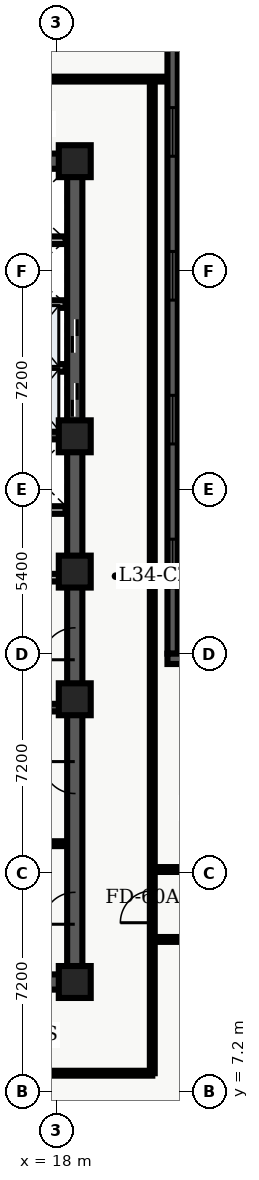
"""IFC4 building model, lengths in metres.
Left out: names, types, materials, properties, quantities, classifications, styles, units other than length and angle.
Written with IfcOpenShell. Run it as: python <this file> out.ifc"""

import sys

from ifc_helpers import new_model, entity, si_unit, converted_unit, direction, frame, origin_with_axes, origin_2d_with_axis, place, context, subcontext, project, spatial, polyline, rectangle, outline, extrude, element, fill, save


model = new_model("IFC4")
c1 = context("Model", 3, precision=1e-05, world=origin_with_axes(), true_north=direction((0.0, 1.0)))
c2 = subcontext(c1, "Body", "Model", "MODEL_VIEW")
j1 = project(units=[si_unit("LENGTHUNIT", "METRE"), converted_unit("PLANEANGLEUNIT", "DEGREE", entity("IfcPlaneAngleMeasure", 0.017), si_unit("PLANEANGLEUNIT", "RADIAN"), dimensions=[0, 0, 0, 0, 0, 0, 0])], contexts=[c1])
p1 = place(None, origin_with_axes())
s1 = spatial("IfcSite", under=j1, at=p1, CompositionType="ELEMENT")
p2 = place(p1, origin_with_axes())
s2 = spatial("IfcBuilding", under=s1, at=p2, CompositionType="ELEMENT")
p3 = place(p2, frame((0.0, 0.0, 140.7), z_axis=(0.0, 0.0, 1.0), x_axis=(1.0, 0.0, 0.0)))
s3 = spatial("IfcBuildingStorey", under=s2, at=p3, CompositionType="ELEMENT", Elevation=140.7)
p4 = place(p3, frame((11.4, 10.8, 0.0), z_axis=(0.0, 0.0, 1.0), x_axis=(1.0, 0.0, 0.0)))
e1 = element("IfcWall", 1, at=p4, inside=s3, PredefinedType="SHEAR", context=c2, shape_type="SweptSolid", body=[
    extrude(outline(polyline([(0.0, -0.25), (7.2, -0.25), (7.2, 0.25), (0.0, 0.25), (0.0, -0.25)])), origin_with_axes(), (0.0, 0.0, 1.0), 3.66),
])
p5 = place(p4, frame((2.625, 0.0, 0.0), z_axis=(0.0, 0.0, 1.0), x_axis=(1.0, 0.0, 0.0)))
e2 = element("IfcOpeningElement", 2, at=p5, cuts=e1, PredefinedType="OPENING", context=c2, shape_type="SweptSolid", body=[
    extrude(rectangle(XDim=1.05, YDim=0.52, at=origin_2d_with_axis()), origin_with_axes(), (0.0, 0.0, 1.0), 2.15),
])
p6 = place(p3, frame((11.4, 37.8, 0.0), z_axis=(0.0, 0.0, 1.0), x_axis=(1.0, 0.0, 0.0)))
e3 = element("IfcWall", 3, at=p6, inside=s3, PredefinedType="SHEAR", context=c2, shape_type="SweptSolid", body=[
    extrude(outline(polyline([(0.0, -0.25), (7.2, -0.25), (7.2, 0.25), (0.0, 0.25), (0.0, -0.25)])), origin_with_axes(), (0.0, 0.0, 1.0), 3.66),
])
p7 = place(p6, frame((2.625, 0.0, 0.0), z_axis=(0.0, 0.0, 1.0), x_axis=(1.0, 0.0, 0.0)))
e4 = element("IfcOpeningElement", 4, at=p7, cuts=e3, PredefinedType="OPENING", context=c2, shape_type="SweptSolid", body=[
    extrude(rectangle(XDim=1.05, YDim=0.52, at=origin_2d_with_axis()), origin_with_axes(), (0.0, 0.0, 1.0), 2.15),
])
p8 = place(p3, frame((18.6, 10.8, 0.0), z_axis=(0.0, 0.0, 1.0), x_axis=(0.0, 1.0, 0.0)))
e5 = element("IfcWall", 5, at=p8, inside=s3, PredefinedType="SHEAR", context=c2, shape_type="SweptSolid", body=[
    extrude(outline(polyline([(0.0, -0.25), (13.5, -0.25), (13.5, 0.25), (0.0, 0.25), (0.0, -0.25)])), origin_with_axes(), (0.0, 0.0, 1.0), 3.66),
])
p9 = place(p8, frame((11.125, 0.0, 0.0), z_axis=(0.0, 0.0, 1.0), x_axis=(1.0, 0.0, 0.0)))
e6 = element("IfcOpeningElement", 6, at=p9, cuts=e5, PredefinedType="OPENING", context=c2, shape_type="SweptSolid", body=[
    extrude(rectangle(XDim=1.05, YDim=0.52, at=origin_2d_with_axis()), origin_with_axes(), (0.0, 0.0, 1.0), 2.15),
])
p10 = place(p8, frame((2.425, 0.0, 0.0), z_axis=(0.0, 0.0, 1.0), x_axis=(1.0, 0.0, 0.0)))
e7 = element("IfcOpeningElement", 7, at=p10, cuts=e5, PredefinedType="OPENING", context=c2, shape_type="SweptSolid", body=[
    extrude(rectangle(XDim=1.05, YDim=0.52, at=origin_2d_with_axis()), origin_with_axes(), (0.0, 0.0, 1.0), 2.15),
])
p11 = place(p8, frame((6.725, 0.0, 0.0), z_axis=(0.0, 0.0, 1.0), x_axis=(1.0, 0.0, 0.0)))
e8 = element("IfcOpeningElement", 8, at=p11, cuts=e5, PredefinedType="OPENING", context=c2, shape_type="SweptSolid", body=[
    extrude(rectangle(XDim=1.05, YDim=0.52, at=origin_2d_with_axis()), origin_with_axes(), (0.0, 0.0, 1.0), 2.15),
])
p12 = place(p3, frame((18.6, 24.3, 0.0), z_axis=(0.0, 0.0, 1.0), x_axis=(0.0, 1.0, 0.0)))
e9 = element("IfcWall", 9, at=p12, inside=s3, PredefinedType="SHEAR", context=c2, shape_type="SweptSolid", body=[
    extrude(outline(polyline([(0.0, -0.25), (13.5, -0.25), (13.5, 0.25), (0.0, 0.25), (0.0, -0.25)])), origin_with_axes(), (0.0, 0.0, 1.0), 3.66),
])
p13 = place(p12, frame((5.65, 0.0, 0.0), z_axis=(0.0, 0.0, 1.0), x_axis=(1.0, 0.0, 0.0)))
e10 = element("IfcOpeningElement", 10, at=p13, cuts=e9, PredefinedType="OPENING", context=c2, shape_type="SweptSolid", body=[
    extrude(rectangle(XDim=1.1, YDim=0.52, at=origin_2d_with_axis()), origin_with_axes(), (0.0, 0.0, 1.0), 2.15),
])
p14 = place(p12, frame((7.75, 0.0, 0.0), z_axis=(0.0, 0.0, 1.0), x_axis=(1.0, 0.0, 0.0)))
e11 = element("IfcOpeningElement", 11, at=p14, cuts=e9, PredefinedType="OPENING", context=c2, shape_type="SweptSolid", body=[
    extrude(rectangle(XDim=1.1, YDim=0.52, at=origin_2d_with_axis()), origin_with_axes(), (0.0, 0.0, 1.0), 2.15),
])
for number, where, z_axis, x_axis in (
    (12, (11.65, 19.825, 0.0), (0.0, 0.0, 1.0), (1.0, 0.0, 0.0)),
    (13, (11.65, 28.775, 0.0), (0.0, 0.0, 1.0), (1.0, 0.0, 0.0)),
):
    element("IfcWall", number, at=place(p3, frame(where, z_axis=z_axis, x_axis=x_axis)), inside=s3, PredefinedType="SHEAR", context=c2, shape_type="SweptSolid", body=[
        extrude(outline(polyline([(0.0, -0.125), (6.7, -0.125), (6.7, 0.125), (0.0, 0.125), (0.0, -0.125)])), origin_with_axes(), (0.0, 0.0, 1.0), 3.66),
    ])
p15 = place(p3, frame((11.7, 24.1, 0.0), z_axis=(0.0, 0.0, 1.0), x_axis=(1.0, 0.0, 0.0)))
e14 = element("IfcWall", 14, at=p15, inside=s3, PredefinedType="SOLIDWALL", context=c2, shape_type="SweptSolid", body=[
    extrude(outline(polyline([(0.0, -0.125), (6.6, -0.125), (6.6, 0.125), (0.0, 0.125), (0.0, -0.125)])), origin_with_axes(), (0.0, 0.0, 1.0), 2.7),
])
p16 = place(p15, frame((3.6, 0.0, 0.0), z_axis=(0.0, 0.0, 1.0), x_axis=(1.0, 0.0, 0.0)))
e15 = element("IfcOpeningElement", 15, at=p16, cuts=e14, PredefinedType="OPENING", context=c2, shape_type="SweptSolid", body=[
    extrude(rectangle(XDim=0.9, YDim=0.27, at=origin_2d_with_axis()), origin_with_axes(), (0.0, 0.0, 1.0), 2.15),
])
p17 = place(p15, frame((5.65, 0.0, 0.0), z_axis=(0.0, 0.0, 1.0), x_axis=(1.0, 0.0, 0.0)))
e16 = element("IfcOpeningElement", 16, at=p17, cuts=e14, PredefinedType="OPENING", context=c2, shape_type="SweptSolid", body=[
    extrude(rectangle(XDim=0.9, YDim=0.27, at=origin_2d_with_axis()), origin_with_axes(), (0.0, 0.0, 1.0), 2.15),
])
p18 = place(p3, frame((11.7, 26.325, 0.0), z_axis=(0.0, 0.0, 1.0), x_axis=(1.0, 0.0, 0.0)))
e17 = element("IfcWall", 17, at=p18, inside=s3, PredefinedType="SOLIDWALL", context=c2, shape_type="SweptSolid", body=[
    extrude(outline(polyline([(0.0, -0.125), (6.6, -0.125), (6.6, 0.125), (0.0, 0.125), (0.0, -0.125)])), origin_with_axes(), (0.0, 0.0, 1.0), 2.7),
])
p19 = place(p18, frame((3.5, 0.0, 0.0), z_axis=(0.0, 0.0, 1.0), x_axis=(1.0, 0.0, 0.0)))
e18 = element("IfcOpeningElement", 18, at=p19, cuts=e17, PredefinedType="OPENING", context=c2, shape_type="SweptSolid", body=[
    extrude(rectangle(XDim=0.9, YDim=0.27, at=origin_2d_with_axis()), origin_with_axes(), (0.0, 0.0, 1.0), 2.15),
])
for number, where, z_axis, x_axis in (
    (19, (18.6, 10.8, 0.0), (0.0, 0.0, 1.0), (1.0, 0.0, 0.0)),
    (20, (18.6, 20.1, 0.0), (0.0, 0.0, 1.0), (1.0, 0.0, 0.0)),
    (21, (18.6, 24.3, 0.0), (0.0, 0.0, 1.0), (1.0, 0.0, 0.0)),
    (22, (18.6, 28.75, 0.0), (0.0, 0.0, 1.0), (1.0, 0.0, 0.0)),
    (23, (18.6, 37.8, 0.0), (0.0, 0.0, 1.0), (1.0, 0.0, 0.0)),
):
    element("IfcColumn", number, at=place(p3, frame(where, z_axis=z_axis, x_axis=x_axis)), inside=s3, PredefinedType="COLUMN", context=c2, shape_type="SweptSolid", body=[
        extrude(rectangle(XDim=1.05, YDim=1.05, at=origin_2d_with_axis()), origin_with_axes(), (0.0, 0.0, 1.0), 3.9),
    ])
p20 = place(p3, frame((15.84, 15.35, 0.0), z_axis=(0.0, 0.0, 1.0), x_axis=(1.0, 0.0, 0.0)))
e24 = element("IfcWall", 24, at=p20, inside=s3, PredefinedType="PARTITIONING", context=c2, shape_type="SweptSolid", body=[
    extrude(outline(polyline([(0.0, -0.08), (2.46, -0.08), (2.46, 0.08), (0.0, 0.08), (0.0, -0.08)])), origin_with_axes(), (0.0, 0.0, 1.0), 2.7),
])
for number, where, z_axis, x_axis in (
    (25, (15.84, 31.0, 0.0), (0.0, 0.0, 1.0), (1.0, 0.0, 0.0)),
    (26, (15.84, 33.1, 0.0), (0.0, 0.0, 1.0), (1.0, 0.0, 0.0)),
    (27, (15.84, 35.2, 0.0), (0.0, 0.0, 1.0), (1.0, 0.0, 0.0)),
):
    element("IfcWall", number, at=place(p3, frame(where, z_axis=z_axis, x_axis=x_axis)), inside=s3, PredefinedType="SOLIDWALL", context=c2, shape_type="SweptSolid", body=[
        extrude(outline(polyline([(0.0, -0.125), (2.46, -0.125), (2.46, 0.125), (0.0, 0.125), (0.0, -0.125)])), origin_with_axes(), (0.0, 0.0, 1.0), 2.7),
    ])
p21 = place(p3, frame((2.6, 7.8, 0.0), z_axis=(0.0, 0.0, 1.0), x_axis=(1.0, 0.0, 0.0)))
e28 = element("IfcWall", 28, at=p21, inside=s3, PredefinedType="PARTITIONING", context=c2, shape_type="SweptSolid", body=[
    extrude(outline(polyline([(0.0, -0.08), (18.55, -0.08), (18.55, 0.08), (0.0, 0.08), (0.0, -0.08)])), origin_with_axes(), (0.0, 0.0, 1.0), 2.7),
])
p22 = place(p21, frame((9.245, 0.0, 0.0), z_axis=(0.0, 0.0, 1.0), x_axis=(1.0, 0.0, 0.0)))
e29 = element("IfcOpeningElement", 29, at=p22, cuts=e28, PredefinedType="OPENING", context=c2, shape_type="SweptSolid", body=[
    extrude(rectangle(XDim=1.2, YDim=0.18, at=origin_2d_with_axis()), origin_with_axes(), (0.0, 0.0, 1.0), 2.2),
])
p23 = place(p3, frame((2.6, 40.5, 0.0), z_axis=(0.0, 0.0, 1.0), x_axis=(1.0, 0.0, 0.0)))
e30 = element("IfcWall", 30, at=p23, inside=s3, PredefinedType="PARTITIONING", context=c2, shape_type="SweptSolid", body=[
    extrude(outline(polyline([(0.0, -0.08), (19.054, -0.08), (19.054, 0.08), (0.0, 0.08), (0.0, -0.08)])), origin_with_axes(), (0.0, 0.0, 1.0), 2.7),
])
p24 = place(p23, frame((1.314, 0.0, 0.0), z_axis=(0.0, 0.0, 1.0), x_axis=(1.0, 0.0, 0.0)))
e31 = element("IfcOpeningElement", 31, at=p24, cuts=e30, PredefinedType="OPENING", context=c2, shape_type="SweptSolid", body=[
    extrude(rectangle(XDim=1.0, YDim=0.18, at=origin_2d_with_axis()), origin_with_axes(), (0.0, 0.0, 1.0), 2.15),
])
p25 = place(p23, frame((6.279, 0.0, 0.0), z_axis=(0.0, 0.0, 1.0), x_axis=(1.0, 0.0, 0.0)))
e32 = element("IfcOpeningElement", 32, at=p25, cuts=e30, PredefinedType="OPENING", context=c2, shape_type="SweptSolid", body=[
    extrude(rectangle(XDim=1.0, YDim=0.18, at=origin_2d_with_axis()), origin_with_axes(), (0.0, 0.0, 1.0), 2.15),
])
p26 = place(p23, frame((10.768, 0.0, 0.0), z_axis=(0.0, 0.0, 1.0), x_axis=(1.0, 0.0, 0.0)))
e33 = element("IfcOpeningElement", 33, at=p26, cuts=e30, PredefinedType="OPENING", context=c2, shape_type="SweptSolid", body=[
    extrude(rectangle(XDim=1.0, YDim=0.18, at=origin_2d_with_axis()), origin_with_axes(), (0.0, 0.0, 1.0), 2.15),
])
p27 = place(p23, frame((14.298, 0.0, 0.0), z_axis=(0.0, 0.0, 1.0), x_axis=(1.0, 0.0, 0.0)))
e34 = element("IfcOpeningElement", 34, at=p27, cuts=e30, PredefinedType="OPENING", context=c2, shape_type="SweptSolid", body=[
    extrude(rectangle(XDim=1.0, YDim=0.18, at=origin_2d_with_axis()), origin_with_axes(), (0.0, 0.0, 1.0), 2.15),
])
p28 = place(p3, frame((21.15, 7.8, 0.0), z_axis=(0.0, 0.0, 1.0), x_axis=(0.0, 1.0, 0.0)))
e35 = element("IfcWall", 35, at=p28, inside=s3, PredefinedType="PARTITIONING", context=c2, shape_type="SweptSolid", body=[
    extrude(outline(polyline([(0.0, -0.08), (32.7, -0.08), (32.7, 0.08), (0.0, 0.08), (0.0, -0.08)])), origin_with_axes(), (0.0, 0.0, 1.0), 2.7),
])
p29 = place(p28, frame((5.475, 0.0, 0.0), z_axis=(0.0, 0.0, 1.0), x_axis=(1.0, 0.0, 0.0)))
e36 = element("IfcOpeningElement", 36, at=p29, cuts=e35, PredefinedType="OPENING", context=c2, shape_type="SweptSolid", body=[
    extrude(rectangle(XDim=1.05, YDim=0.18, at=origin_2d_with_axis()), origin_with_axes(), (0.0, 0.0, 1.0), 2.15),
])
p30 = place(p3, frame((21.15, 12.2, 0.0), z_axis=(0.0, 0.0, 1.0), x_axis=(1.0, 0.0, 0.0)))
e37 = element("IfcWall", 37, at=p30, inside=s3, PredefinedType="PARTITIONING", context=c2, shape_type="SweptSolid", body=[
    extrude(outline(polyline([(0.0, -0.08), (15.2, -0.08), (15.2, 0.08), (0.0, 0.08), (0.0, -0.08)])), origin_with_axes(), (0.0, 0.0, 1.0), 2.7),
])
p31 = place(p30, frame((1.764, 0.0, 0.0), z_axis=(0.0, 0.0, 1.0), x_axis=(1.0, 0.0, 0.0)))
e38 = element("IfcOpeningElement", 38, at=p31, cuts=e37, PredefinedType="OPENING", context=c2, shape_type="SweptSolid", body=[
    extrude(rectangle(XDim=1.0, YDim=0.18, at=origin_2d_with_axis()), origin_with_axes(), (0.0, 0.0, 1.0), 2.15),
])
p32 = place(p30, frame((4.34, 0.0, 0.0), z_axis=(0.0, 0.0, 1.0), x_axis=(1.0, 0.0, 0.0)))
e39 = element("IfcOpeningElement", 39, at=p32, cuts=e37, PredefinedType="OPENING", context=c2, shape_type="SweptSolid", body=[
    extrude(rectangle(XDim=1.0, YDim=0.18, at=origin_2d_with_axis()), origin_with_axes(), (0.0, 0.0, 1.0), 2.15),
])
p33 = place(p30, frame((8.545, 0.0, 0.0), z_axis=(0.0, 0.0, 1.0), x_axis=(1.0, 0.0, 0.0)))
e40 = element("IfcOpeningElement", 40, at=p33, cuts=e37, PredefinedType="OPENING", context=c2, shape_type="SweptSolid", body=[
    extrude(rectangle(XDim=1.0, YDim=0.18, at=origin_2d_with_axis()), origin_with_axes(), (0.0, 0.0, 1.0), 2.15),
])
p34 = place(p30, frame((12.88, 0.0, 0.0), z_axis=(0.0, 0.0, 1.0), x_axis=(1.0, 0.0, 0.0)))
e41 = element("IfcOpeningElement", 41, at=p34, cuts=e37, PredefinedType="OPENING", context=c2, shape_type="SweptSolid", body=[
    extrude(rectangle(XDim=1.0, YDim=0.18, at=origin_2d_with_axis()), origin_with_axes(), (0.0, 0.0, 1.0), 2.15),
])
p35 = place(p3, frame((21.15, 14.5, 0.0), z_axis=(0.0, 0.0, 1.0), x_axis=(1.0, 0.0, 0.0)))
e42 = element("IfcWall", 42, at=p35, inside=s3, PredefinedType="PARTITIONING", context=c2, shape_type="SweptSolid", body=[
    extrude(outline(polyline([(0.0, -0.08), (15.2, -0.08), (15.2, 0.08), (0.0, 0.08), (0.0, -0.08)])), origin_with_axes(), (0.0, 0.0, 1.0), 2.7),
])
p36 = place(p35, frame((7.65, 0.0, 0.0), z_axis=(0.0, 0.0, 1.0), x_axis=(1.0, 0.0, 0.0)))
e43 = element("IfcOpeningElement", 43, at=p36, cuts=e42, PredefinedType="OPENING", context=c2, shape_type="SweptSolid", body=[
    extrude(rectangle(XDim=1.2, YDim=0.18, at=origin_2d_with_axis()), origin_with_axes(), (0.0, 0.0, 1.0), 2.2),
])
p37 = place(p3, frame((21.819, 46.46, 0.0), z_axis=(0.0, 0.0, 1.0), x_axis=(0.0, -1.0, 0.0)))
e44 = element("IfcWall", 44, at=p37, inside=s3, PredefinedType="SOLIDWALL", context=c2, shape_type="SweptSolid", body=[
    extrude(outline(polyline([(0.0, -0.17), (24.86, -0.17), (24.86, 0.17), (0.0, 0.17), (0.0, -0.17)])), origin_with_axes(), (0.0, 0.0, 1.0), 3.66),
])
p38 = place(p37, frame((2.966, 0.0, 0.45), z_axis=(0.0, 0.0, 1.0), x_axis=(1.0, 0.0, 0.0)))
e45 = element("IfcOpeningElement", 45, at=p38, cuts=e44, PredefinedType="OPENING", context=c2, shape_type="SweptSolid", body=[
    extrude(rectangle(XDim=1.6, YDim=0.36, at=origin_2d_with_axis()), origin_with_axes(), (0.0, 0.0, 1.0), 2.2),
])
p39 = place(p37, frame((7.698, 0.0, 0.45), z_axis=(0.0, 0.0, 1.0), x_axis=(1.0, 0.0, 0.0)))
e46 = element("IfcOpeningElement", 46, at=p39, cuts=e44, PredefinedType="OPENING", context=c2, shape_type="SweptSolid", body=[
    extrude(rectangle(XDim=1.6, YDim=0.36, at=origin_2d_with_axis()), origin_with_axes(), (0.0, 0.0, 1.0), 2.2),
])
p40 = place(p37, frame((12.43, 0.0, 0.45), z_axis=(0.0, 0.0, 1.0), x_axis=(1.0, 0.0, 0.0)))
e47 = element("IfcOpeningElement", 47, at=p40, cuts=e44, PredefinedType="OPENING", context=c2, shape_type="SweptSolid", body=[
    extrude(rectangle(XDim=1.6, YDim=0.36, at=origin_2d_with_axis()), origin_with_axes(), (0.0, 0.0, 1.0), 2.2),
])
p41 = place(p37, frame((17.162, 0.0, 0.45), z_axis=(0.0, 0.0, 1.0), x_axis=(1.0, 0.0, 0.0)))
e48 = element("IfcOpeningElement", 48, at=p41, cuts=e44, PredefinedType="OPENING", context=c2, shape_type="SweptSolid", body=[
    extrude(rectangle(XDim=1.6, YDim=0.36, at=origin_2d_with_axis()), origin_with_axes(), (0.0, 0.0, 1.0), 2.2),
])
p42 = place(p37, frame((21.894, 0.0, 0.45), z_axis=(0.0, 0.0, 1.0), x_axis=(1.0, 0.0, 0.0)))
e49 = element("IfcOpeningElement", 49, at=p42, cuts=e44, PredefinedType="OPENING", context=c2, shape_type="SweptSolid", body=[
    extrude(rectangle(XDim=1.6, YDim=0.36, at=origin_2d_with_axis()), origin_with_axes(), (0.0, 0.0, 1.0), 2.2),
])
p43 = place(p3, frame((21.649, 21.43, 0.0), z_axis=(0.0, 0.0, 1.0), x_axis=(1.0, 0.0, 0.0)))
e50 = element("IfcWall", 50, at=p43, inside=s3, PredefinedType="SOLIDWALL", context=c2, shape_type="SweptSolid", body=[
    extrude(outline(polyline([(0.0, -0.17), (16.751, -0.17), (16.751, 0.17), (0.0, 0.17), (0.0, -0.17)])), origin_with_axes(), (0.0, 0.0, 1.0), 3.66),
])
p44 = place(p43, frame((3.192, 0.0, 0.45), z_axis=(0.0, 0.0, 1.0), x_axis=(1.0, 0.0, 0.0)))
e51 = element("IfcOpeningElement", 51, at=p44, cuts=e50, PredefinedType="OPENING", context=c2, shape_type="SweptSolid", body=[
    extrude(rectangle(XDim=1.8, YDim=0.36, at=origin_2d_with_axis()), origin_with_axes(), (0.0, 0.0, 1.0), 2.1),
])
p45 = place(p43, frame((8.375, 0.0, 0.45), z_axis=(0.0, 0.0, 1.0), x_axis=(1.0, 0.0, 0.0)))
e52 = element("IfcOpeningElement", 52, at=p45, cuts=e50, PredefinedType="OPENING", context=c2, shape_type="SweptSolid", body=[
    extrude(rectangle(XDim=1.8, YDim=0.36, at=origin_2d_with_axis()), origin_with_axes(), (0.0, 0.0, 1.0), 2.1),
])
p46 = place(p43, frame((13.109, 0.0, 0.45), z_axis=(0.0, 0.0, 1.0), x_axis=(1.0, 0.0, 0.0)))
e53 = element("IfcOpeningElement", 53, at=p46, cuts=e50, PredefinedType="OPENING", context=c2, shape_type="SweptSolid", body=[
    extrude(rectangle(XDim=1.8, YDim=0.36, at=origin_2d_with_axis()), origin_with_axes(), (0.0, 0.0, 1.0), 2.1),
])
p47 = place(p12, frame((5.65, 0.0, 0.0), z_axis=(0.0, 0.0, 1.0), x_axis=(1.0, 0.0, 0.0)))
e54 = element("IfcDoor", 54, at=p47, inside=s3, OperationType="SLIDING_TO_LEFT", PredefinedType="DOOR", context=c2, shape_type="SweptSolid", body=[
    extrude(rectangle(XDim=1.1, YDim=0.09, at=origin_2d_with_axis()), origin_with_axes(), (0.0, 0.0, 1.0), 2.15),
])
fill(e10, e54)
p48 = place(p12, frame((7.75, 0.0, 0.0), z_axis=(0.0, 0.0, 1.0), x_axis=(1.0, 0.0, 0.0)))
e55 = element("IfcDoor", 55, at=p48, inside=s3, OperationType="SLIDING_TO_RIGHT", PredefinedType="DOOR", context=c2, shape_type="SweptSolid", body=[
    extrude(rectangle(XDim=1.1, YDim=0.09, at=origin_2d_with_axis()), origin_with_axes(), (0.0, 0.0, 1.0), 2.15),
])
fill(e11, e55)
p49 = place(p8, frame((11.125, 0.0, 0.0), z_axis=(0.0, 0.0, 1.0), x_axis=(1.0, 0.0, 0.0)))
e56 = element("IfcDoor", 56, at=p49, inside=s3, OperationType="SINGLE_SWING_LEFT", PredefinedType="DOOR", context=c2, shape_type="SweptSolid", body=[
    extrude(rectangle(XDim=1.05, YDim=0.09, at=origin_2d_with_axis()), origin_with_axes(), (0.0, 0.0, 1.0), 2.15),
])
fill(e6, e56)
p50 = place(p8, frame((2.425, 0.0, 0.0), z_axis=(0.0, 0.0, 1.0), x_axis=(1.0, 0.0, 0.0)))
e57 = element("IfcDoor", 57, at=p50, inside=s3, OperationType="SINGLE_SWING_LEFT", PredefinedType="DOOR", context=c2, shape_type="SweptSolid", body=[
    extrude(rectangle(XDim=1.05, YDim=0.09, at=origin_2d_with_axis()), origin_with_axes(), (0.0, 0.0, 1.0), 2.15),
])
fill(e7, e57)
p51 = place(p8, frame((6.725, 0.0, 0.0), z_axis=(0.0, 0.0, 1.0), x_axis=(1.0, 0.0, 0.0)))
e58 = element("IfcDoor", 58, at=p51, inside=s3, OperationType="SINGLE_SWING_RIGHT", PredefinedType="DOOR", context=c2, shape_type="SweptSolid", body=[
    extrude(rectangle(XDim=1.05, YDim=0.09, at=origin_2d_with_axis()), origin_with_axes(), (0.0, 0.0, 1.0), 2.15),
])
fill(e8, e58)
p52 = place(p28, frame((5.475, 0.0, 0.0), z_axis=(0.0, 0.0, 1.0), x_axis=(1.0, 0.0, 0.0)))
e59 = element("IfcDoor", 59, at=p52, inside=s3, OperationType="SINGLE_SWING_LEFT", PredefinedType="DOOR", context=c2, shape_type="SweptSolid", body=[
    extrude(rectangle(XDim=1.05, YDim=0.09, at=origin_2d_with_axis()), origin_with_axes(), (0.0, 0.0, 1.0), 2.15),
])
fill(e36, e59)
p53 = place(p37, frame((7.698, 0.0, 0.45), z_axis=(0.0, 0.0, 1.0), x_axis=(1.0, 0.0, 0.0)))
e60 = element("IfcWindow", 60, at=p53, inside=s3, PredefinedType="WINDOW", context=c2, shape_type="SweptSolid", body=[
    extrude(rectangle(XDim=1.6, YDim=0.09, at=origin_2d_with_axis()), origin_with_axes(), (0.0, 0.0, 1.0), 2.2),
])
fill(e46, e60)
p54 = place(p37, frame((12.43, 0.0, 0.45), z_axis=(0.0, 0.0, 1.0), x_axis=(1.0, 0.0, 0.0)))
e61 = element("IfcWindow", 61, at=p54, inside=s3, PredefinedType="WINDOW", context=c2, shape_type="SweptSolid", body=[
    extrude(rectangle(XDim=1.6, YDim=0.09, at=origin_2d_with_axis()), origin_with_axes(), (0.0, 0.0, 1.0), 2.2),
])
fill(e47, e61)
p55 = place(p37, frame((17.162, 0.0, 0.45), z_axis=(0.0, 0.0, 1.0), x_axis=(1.0, 0.0, 0.0)))
e62 = element("IfcWindow", 62, at=p55, inside=s3, PredefinedType="WINDOW", context=c2, shape_type="SweptSolid", body=[
    extrude(rectangle(XDim=1.6, YDim=0.09, at=origin_2d_with_axis()), origin_with_axes(), (0.0, 0.0, 1.0), 2.2),
])
fill(e48, e62)
p56 = place(p37, frame((21.894, 0.0, 0.45), z_axis=(0.0, 0.0, 1.0), x_axis=(1.0, 0.0, 0.0)))
e63 = element("IfcWindow", 63, at=p56, inside=s3, PredefinedType="WINDOW", context=c2, shape_type="SweptSolid", body=[
    extrude(rectangle(XDim=1.6, YDim=0.09, at=origin_2d_with_axis()), origin_with_axes(), (0.0, 0.0, 1.0), 2.2),
])
fill(e49, e63)
save(model, sys.argv[1])
